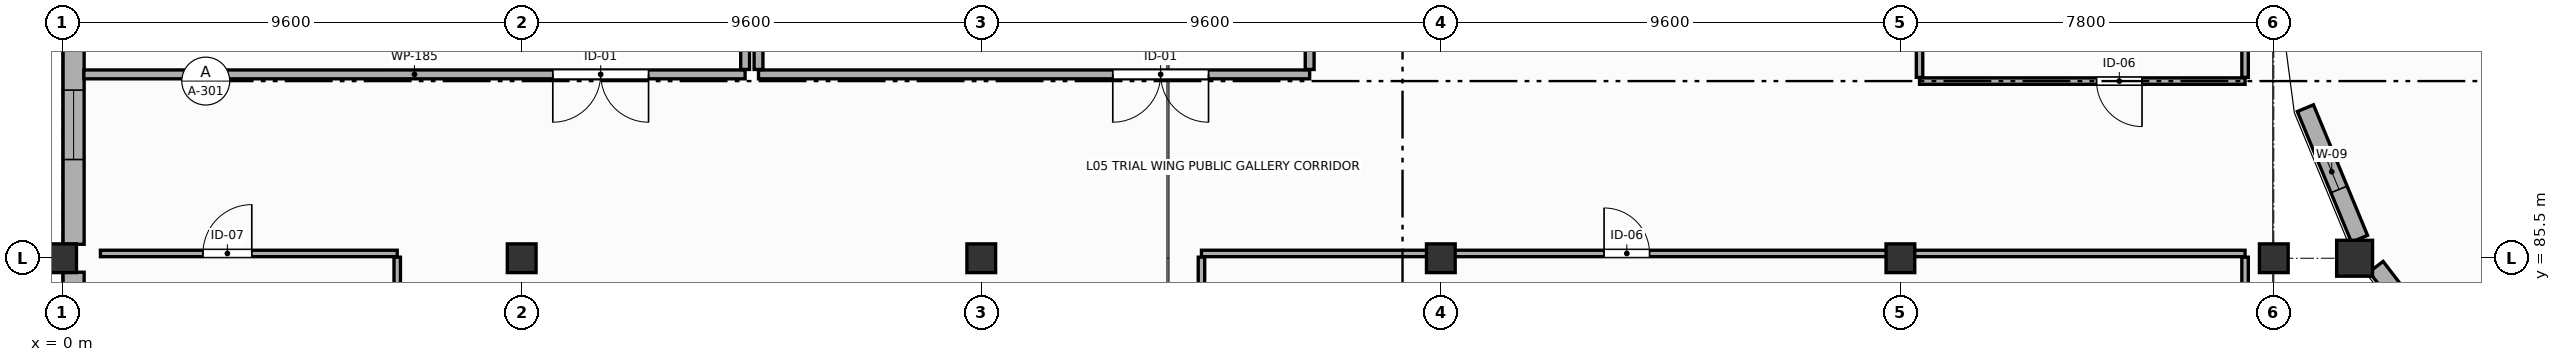
"""IFC4 building model, lengths in metres.
Left out: names, types, materials, properties, quantities, classifications, styles, units other than length and angle.
Written with IfcOpenShell. Run it as: python <this file> out.ifc"""

import sys

from ifc_helpers import new_model, si_unit, direction, frame, frame_2d, origin, origin_2d, place, context, subcontext, project, spatial, rectangle, circle, extrude, element, fill, save


model = new_model("IFC4")
c1 = context("Model", 3, precision=1e-05, world=origin(), true_north=direction((0.0, 1.0)))
c2 = subcontext(c1, "Body", "Model", "MODEL_VIEW")
j1 = project(units=[si_unit("LENGTHUNIT", "METRE"), si_unit("PLANEANGLEUNIT", "RADIAN")], contexts=[c1])
p1 = place(None, origin())
s1 = spatial("IfcSite", under=j1, at=p1, CompositionType="ELEMENT")
p2 = place(p1, origin())
s2 = spatial("IfcBuilding", under=s1, at=p2, CompositionType="ELEMENT")
p3 = place(p2, frame((0.0, 0.0, 18.6)))
s3 = spatial("IfcBuildingStorey", under=s2, at=p3, CompositionType="ELEMENT", Elevation=18.6)
p4 = place(p3, frame((47.888, 85.5, 0.0), z_axis=(0.0, 0.0, 1.0), x_axis=(1.0, 0.0, 0.0)))
e1 = element("IfcColumn", 1, at=p4, inside=s3, PredefinedType="COLUMN", context=c2, shape_type="SweptSolid", body=[
    extrude(circle(Radius=0.375, at=origin_2d()), origin(), (0.0, 0.0, 1.0), 4.2),
])
for number, where, z_axis, x_axis in (
    (2, (0.0, 85.5, 0.0), (0.0, 0.0, 1.0), (1.0, 0.0, 0.0)),
    (3, (9.6, 85.5, 0.0), (0.0, 0.0, 1.0), (1.0, 0.0, 0.0)),
    (4, (19.2, 85.5, 0.0), (0.0, 0.0, 1.0), (1.0, 0.0, 0.0)),
    (5, (28.8, 85.5, 0.0), (0.0, 0.0, 1.0), (1.0, 0.0, 0.0)),
    (6, (38.4, 85.5, 0.0), (0.0, 0.0, 1.0), (1.0, 0.0, 0.0)),
    (7, (46.2, 85.5, 0.0), (0.0, 0.0, 1.0), (1.0, 0.0, 0.0)),
):
    element("IfcColumn", number, at=place(p3, frame(where, z_axis=z_axis, x_axis=x_axis)), inside=s3, PredefinedType="COLUMN", context=c2, shape_type="SweptSolid", body=[
        extrude(rectangle(XDim=0.6, YDim=0.6, at=origin_2d()), origin(), (0.0, 0.0, 1.0), 4.2),
    ])
p5 = place(p3, frame((46.86, 88.635, 0.0), z_axis=(0.0, 0.0, 1.0), x_axis=(0.382641509163, -0.923896896556, 0.0)))
e8 = element("IfcWall", 8, at=p5, inside=s3, PredefinedType="ELEMENTEDWALL", context=c2, shape_type="SweptSolid", body=[
    extrude(rectangle(XDim=2.952, YDim=0.365, at=frame_2d((1.476, 0.0))), origin(), (0.0, 0.0, 1.0), 3.09),
])
p6 = place(p5, frame((1.037, 0.0, 0.85)))
e9 = element("IfcOpeningElement", 9, at=p6, cuts=e8, PredefinedType="OPENING", context=c2, shape_type="SweptSolid", body=[
    extrude(rectangle(XDim=0.8, YDim=1.7, at=frame_2d((0.4, 0.85))), frame((0.0, 0.192, 0.0), z_axis=(0.0, -1.0, 0.0), x_axis=(1.0, 0.0, 0.0)), (0.0, 0.0, 1.0), 0.385),
])
p7 = place(p3, frame((48.339, 85.323, 0.0), z_axis=(0.0, 0.0, 1.0), x_axis=(0.608729278603, -0.79337800913, 0.0)))
e10 = element("IfcWall", 10, at=p7, inside=s3, PredefinedType="ELEMENTEDWALL", context=c2, shape_type="SweptSolid", body=[
    extrude(rectangle(XDim=2.875, YDim=0.365, at=frame_2d((1.437, 0.0))), origin(), (0.0, 0.0, 1.0), 3.09),
])
p8 = place(p7, frame((1.037, 0.0, 0.85)))
e11 = element("IfcOpeningElement", 11, at=p8, cuts=e10, PredefinedType="OPENING", context=c2, shape_type="SweptSolid", body=[
    extrude(rectangle(XDim=0.8, YDim=1.7, at=frame_2d((0.4, 0.85))), frame((0.0, 0.192, 0.0), z_axis=(0.0, -1.0, 0.0), x_axis=(1.0, 0.0, 0.0)), (0.0, 0.0, 1.0), 0.385),
])
p9 = place(p3, frame((0.24, 74.692, 0.0), z_axis=(0.0, 0.0, 1.0), x_axis=(0.0, 1.0, 0.0)))
e12 = element("IfcWall", 12, at=p9, inside=s3, PredefinedType="STANDARD", context=c2, shape_type="SweptSolid", body=[
    extrude(rectangle(XDim=10.516, YDim=0.44, at=frame_2d((5.258, 0.0))), origin(), (0.0, 0.0, 1.0), 3.09),
])
p10 = place(p9, frame((1.52, 0.0, 0.85)))
e13 = element("IfcOpeningElement", 13, at=p10, cuts=e12, PredefinedType="OPENING", context=c2, shape_type="SweptSolid", body=[
    extrude(rectangle(XDim=1.45, YDim=2.05, at=frame_2d((0.725, 1.025))), frame((0.0, 0.23, 0.0), z_axis=(0.0, -1.0, 0.0), x_axis=(1.0, 0.0, 0.0)), (0.0, 0.0, 1.0), 0.46),
])
p11 = place(p9, frame((4.533, 0.0, 0.85)))
e14 = element("IfcOpeningElement", 14, at=p11, cuts=e12, PredefinedType="OPENING", context=c2, shape_type="SweptSolid", body=[
    extrude(rectangle(XDim=1.45, YDim=2.05, at=frame_2d((0.725, 1.025))), frame((0.0, 0.23, 0.0), z_axis=(0.0, -1.0, 0.0), x_axis=(1.0, 0.0, 0.0)), (0.0, 0.0, 1.0), 0.46),
])
p12 = place(p9, frame((7.546, 0.0, 0.85)))
e15 = element("IfcOpeningElement", 15, at=p12, cuts=e12, PredefinedType="OPENING", context=c2, shape_type="SweptSolid", body=[
    extrude(rectangle(XDim=1.45, YDim=2.05, at=frame_2d((0.725, 1.025))), frame((0.0, 0.23, 0.0), z_axis=(0.0, -1.0, 0.0), x_axis=(1.0, 0.0, 0.0)), (0.0, 0.0, 1.0), 0.46),
])
p13 = place(p3, frame((0.24, 85.792, 0.0), z_axis=(0.0, 0.0, 1.0), x_axis=(0.0, 1.0, 0.0)))
e16 = element("IfcWall", 16, at=p13, inside=s3, PredefinedType="STANDARD", context=c2, shape_type="SweptSolid", body=[
    extrude(rectangle(XDim=12.016, YDim=0.44, at=frame_2d((6.008, 0.0))), origin(), (0.0, 0.0, 1.0), 3.04),
])
p14 = place(p13, frame((1.77, 0.0, 0.77)))
e17 = element("IfcOpeningElement", 17, at=p14, cuts=e16, PredefinedType="OPENING", context=c2, shape_type="SweptSolid", body=[
    extrude(rectangle(XDim=1.45, YDim=2.05, at=frame_2d((0.725, 1.025))), frame((0.0, 0.23, 0.0), z_axis=(0.0, -1.0, 0.0), x_axis=(1.0, 0.0, 0.0)), (0.0, 0.0, 1.0), 0.46),
])
p15 = place(p13, frame((5.283, 0.0, 0.77)))
e18 = element("IfcOpeningElement", 18, at=p15, cuts=e16, PredefinedType="OPENING", context=c2, shape_type="SweptSolid", body=[
    extrude(rectangle(XDim=1.45, YDim=2.05, at=frame_2d((0.725, 1.025))), frame((0.0, 0.23, 0.0), z_axis=(0.0, -1.0, 0.0), x_axis=(1.0, 0.0, 0.0)), (0.0, 0.0, 1.0), 0.46),
])
p16 = place(p13, frame((8.796, 0.0, 0.77)))
e19 = element("IfcOpeningElement", 19, at=p16, cuts=e16, PredefinedType="OPENING", context=c2, shape_type="SweptSolid", body=[
    extrude(rectangle(XDim=1.45, YDim=2.05, at=frame_2d((0.725, 1.025))), frame((0.0, 0.23, 0.0), z_axis=(0.0, -1.0, 0.0), x_axis=(1.0, 0.0, 0.0)), (0.0, 0.0, 1.0), 0.46),
])
p17 = place(p3, frame((14.267, 89.34, 0.0), z_axis=(0.0, 0.0, 1.0), x_axis=(-1.0, 0.0, 0.0)))
e20 = element("IfcWall", 20, at=p17, inside=s3, PredefinedType="PARTITIONING", context=c2, shape_type="SweptSolid", body=[
    extrude(rectangle(XDim=13.813, YDim=0.185, at=frame_2d((6.906, 0.0))), origin(), (0.0, 0.0, 1.0), 3.09),
])
p18 = place(p17, frame((2.017, 0.0, 0.0)))
e21 = element("IfcOpeningElement", 21, at=p18, cuts=e20, PredefinedType="OPENING", context=c2, shape_type="SweptSolid", body=[
    extrude(rectangle(XDim=2.0, YDim=2.5, at=frame_2d((1.0, 1.25))), frame((0.0, 0.103, 0.0), z_axis=(0.0, -1.0, 0.0), x_axis=(1.0, 0.0, 0.0)), (0.0, 0.0, 1.0), 0.205),
])
p19 = place(p3, frame((14.267, 112.346, 0.0), z_axis=(0.0, 0.0, 1.0), x_axis=(0.0, -1.0, 0.0)))
e22 = element("IfcWall", 22, at=p19, inside=s3, PredefinedType="PARTITIONING", context=c2, shape_type="SweptSolid", body=[
    extrude(rectangle(XDim=22.904, YDim=0.185, at=frame_2d((11.452, 0.0))), origin(), (0.0, 0.0, 1.0), 3.29),
])
p20 = place(p3, frame((26.06, 89.34, 0.0), z_axis=(0.0, 0.0, 1.0), x_axis=(-1.0, 0.0, 0.0)))
e23 = element("IfcWall", 23, at=p20, inside=s3, PredefinedType="PARTITIONING", context=c2, shape_type="SweptSolid", body=[
    extrude(rectangle(XDim=11.513, YDim=0.185, at=frame_2d((5.756, 0.0))), origin(), (0.0, 0.0, 1.0), 3.09),
])
p21 = place(p20, frame((2.113, 0.0, 0.0)))
e24 = element("IfcOpeningElement", 24, at=p21, cuts=e23, PredefinedType="OPENING", context=c2, shape_type="SweptSolid", body=[
    extrude(rectangle(XDim=2.0, YDim=2.5, at=frame_2d((1.0, 1.25))), frame((0.0, 0.103, 0.0), z_axis=(0.0, -1.0, 0.0), x_axis=(1.0, 0.0, 0.0)), (0.0, 0.0, 1.0), 0.205),
])
for number, where, z_axis, x_axis in (
    (25, (14.547, 89.442, 0.0), (0.0, 0.0, 1.0), (0.0, 1.0, 0.0)),
    (26, (26.06, 97.597, 0.0), (0.0, 0.0, 1.0), (0.0, -1.0, 0.0)),
):
    element("IfcWall", number, at=place(p3, frame(where, z_axis=z_axis, x_axis=x_axis)), inside=s3, PredefinedType="PARTITIONING", context=c2, shape_type="SweptSolid", body=[
        extrude(rectangle(XDim=8.155, YDim=0.185, at=frame_2d((4.078, 0.0))), origin(), (0.0, 0.0, 1.0), 3.34),
    ])
p22 = place(p3, frame((45.6, 89.2, 0.0), z_axis=(0.0, 0.0, 1.0), x_axis=(-1.0, 0.0, 0.0)))
e27 = element("IfcWall", 27, at=p22, inside=s3, PredefinedType="PARTITIONING", context=c2, shape_type="SweptSolid", body=[
    extrude(rectangle(XDim=6.8, YDim=0.135, at=frame_2d((3.4, 0.0))), origin(), (0.0, 0.0, 1.0), 3.09),
])
p23 = place(p22, frame((2.153, 0.0, 0.0)))
e28 = element("IfcOpeningElement", 28, at=p23, cuts=e27, PredefinedType="OPENING", context=c2, shape_type="SweptSolid", body=[
    extrude(rectangle(XDim=0.95, YDim=2.15, at=frame_2d((0.475, 1.075))), frame((0.0, 0.077, 0.0), z_axis=(0.0, -1.0, 0.0), x_axis=(1.0, 0.0, 0.0)), (0.0, 0.0, 1.0), 0.155),
])
p24 = place(p3, frame((38.8, 89.278, 0.0), z_axis=(0.0, 0.0, 1.0), x_axis=(0.0, 1.0, 0.0)))
e29 = element("IfcWall", 29, at=p24, inside=s3, PredefinedType="PARTITIONING", context=c2, shape_type="SweptSolid", body=[
    extrude(rectangle(XDim=12.645, YDim=0.135, at=frame_2d((6.323, 0.0))), origin(), (0.0, 0.0, 1.0), 3.04),
])
p25 = place(p3, frame((45.6, 101.923, 0.0), z_axis=(0.0, 0.0, 1.0), x_axis=(0.0, -1.0, 0.0)))
e30 = element("IfcWall", 30, at=p25, inside=s3, PredefinedType="PARTITIONING", context=c2, shape_type="SweptSolid", body=[
    extrude(rectangle(XDim=12.645, YDim=0.135, at=frame_2d((6.323, 0.0))), origin(), (0.0, 0.0, 1.0), 3.34),
])
p26 = place(p3, frame((0.8, 85.6, 0.0), z_axis=(0.0, 0.0, 1.0), x_axis=(1.0, 0.0, 0.0)))
e31 = element("IfcWall", 31, at=p26, inside=s3, PredefinedType="PARTITIONING", context=c2, shape_type="SweptSolid", body=[
    extrude(rectangle(XDim=6.2, YDim=0.135, at=frame_2d((3.1, 0.0))), origin(), (0.0, 0.0, 1.0), 3.29),
])
p27 = place(p26, frame((2.142, 0.0, 0.0)))
e32 = element("IfcOpeningElement", 32, at=p27, cuts=e31, PredefinedType="OPENING", context=c2, shape_type="SweptSolid", body=[
    extrude(rectangle(XDim=1.02, YDim=2.15, at=frame_2d((0.51, 1.075))), frame((0.0, 0.077, 0.0), z_axis=(0.0, -1.0, 0.0), x_axis=(1.0, 0.0, 0.0)), (0.0, 0.0, 1.0), 0.155),
])
p28 = place(p3, frame((7.0, 85.522, 0.0), z_axis=(0.0, 0.0, 1.0), x_axis=(0.0, -1.0, 0.0)))
e33 = element("IfcWall", 33, at=p28, inside=s3, PredefinedType="PARTITIONING", context=c2, shape_type="SweptSolid", body=[
    extrude(rectangle(XDim=17.868, YDim=0.135, at=frame_2d((8.934, 0.0))), origin(), (0.0, 0.0, 1.0), 3.29),
])
p29 = place(p3, frame((23.8, 85.6, 0.0), z_axis=(0.0, 0.0, 1.0), x_axis=(1.0, 0.0, 0.0)))
e34 = element("IfcWall", 34, at=p29, inside=s3, PredefinedType="PARTITIONING", context=c2, shape_type="SweptSolid", body=[
    extrude(rectangle(XDim=21.8, YDim=0.135, at=frame_2d((10.9, 0.0))), origin(), (0.0, 0.0, 1.0), 3.09),
])
p30 = place(p29, frame((8.41, 0.0, 0.0)))
e35 = element("IfcOpeningElement", 35, at=p30, cuts=e34, PredefinedType="OPENING", context=c2, shape_type="SweptSolid", body=[
    extrude(rectangle(XDim=0.95, YDim=2.15, at=frame_2d((0.475, 1.075))), frame((0.0, 0.077, 0.0), z_axis=(0.0, -1.0, 0.0), x_axis=(1.0, 0.0, 0.0)), (0.0, 0.0, 1.0), 0.155),
])
p31 = place(p3, frame((23.8, 67.654, 0.0), z_axis=(0.0, 0.0, 1.0), x_axis=(0.0, 1.0, 0.0)))
e36 = element("IfcWall", 36, at=p31, inside=s3, PredefinedType="PARTITIONING", context=c2, shape_type="SweptSolid", body=[
    extrude(rectangle(XDim=17.868, YDim=0.135, at=frame_2d((8.934, 0.0))), origin(), (0.0, 0.0, 1.0), 3.29),
])
p32 = place(p3, frame((45.6, 85.522, 0.0), z_axis=(0.0, 0.0, 1.0), x_axis=(0.0, -1.0, 0.0)))
e37 = element("IfcWall", 37, at=p32, inside=s3, PredefinedType="PARTITIONING", context=c2, shape_type="SweptSolid", body=[
    extrude(rectangle(XDim=17.868, YDim=0.135, at=frame_2d((8.934, 0.0))), origin(), (0.0, 0.0, 1.0), 3.39),
])
p33 = place(p6, origin())
e38 = element("IfcWindow", 38, at=p33, inside=s3, PartitioningType="SINGLE_PANEL", PredefinedType="WINDOW", context=c2, shape_type="SweptSolid", body=[
    extrude(rectangle(XDim=0.8, YDim=1.7, at=frame_2d((0.4, 0.85))), frame((0.0, 0.03, 0.0), z_axis=(0.0, -1.0, 0.0), x_axis=(1.0, 0.0, 0.0)), (0.0, 0.0, 1.0), 0.06),
])
fill(e9, e38)
p34 = place(p14, origin())
e39 = element("IfcWindow", 39, at=p34, inside=s3, PartitioningType="SINGLE_PANEL", PredefinedType="WINDOW", context=c2, shape_type="SweptSolid", body=[
    extrude(rectangle(XDim=1.45, YDim=2.05, at=frame_2d((0.725, 1.025))), frame((0.0, 0.03, 0.0), z_axis=(0.0, -1.0, 0.0), x_axis=(1.0, 0.0, 0.0)), (0.0, 0.0, 1.0), 0.06),
])
fill(e17, e39)
p35 = place(p18, origin())
e40 = element("IfcDoor", 40, at=p35, inside=s3, OperationType="DOUBLE_DOOR_SINGLE_SWING", PredefinedType="DOOR", context=c2, shape_type="SweptSolid", body=[
    extrude(rectangle(XDim=2.0, YDim=2.5, at=frame_2d((1.0, 1.25))), frame((0.0, 0.025, 0.0), z_axis=(0.0, -1.0, 0.0), x_axis=(1.0, 0.0, 0.0)), (0.0, 0.0, 1.0), 0.05),
])
fill(e21, e40)
p36 = place(p21, origin())
e41 = element("IfcDoor", 41, at=p36, inside=s3, OperationType="DOUBLE_DOOR_SINGLE_SWING", PredefinedType="DOOR", context=c2, shape_type="SweptSolid", body=[
    extrude(rectangle(XDim=2.0, YDim=2.5, at=frame_2d((1.0, 1.25))), frame((0.0, 0.025, 0.0), z_axis=(0.0, -1.0, 0.0), x_axis=(1.0, 0.0, 0.0)), (0.0, 0.0, 1.0), 0.05),
])
fill(e24, e41)
p37 = place(p23, origin())
e42 = element("IfcDoor", 42, at=p37, inside=s3, OperationType="SINGLE_SWING_LEFT", PredefinedType="DOOR", context=c2, shape_type="SweptSolid", body=[
    extrude(rectangle(XDim=0.95, YDim=2.15, at=frame_2d((0.475, 1.075))), frame((0.0, 0.025, 0.0), z_axis=(0.0, -1.0, 0.0), x_axis=(1.0, 0.0, 0.0)), (0.0, 0.0, 1.0), 0.05),
])
fill(e28, e42)
p38 = place(p27, origin())
e43 = element("IfcDoor", 43, at=p38, inside=s3, OperationType="SINGLE_SWING_RIGHT", PredefinedType="DOOR", context=c2, shape_type="SweptSolid", body=[
    extrude(rectangle(XDim=1.02, YDim=2.15, at=frame_2d((0.51, 1.075))), frame((0.0, 0.025, 0.0), z_axis=(0.0, -1.0, 0.0), x_axis=(1.0, 0.0, 0.0)), (0.0, 0.0, 1.0), 0.05),
])
fill(e32, e43)
p39 = place(p30, origin())
e44 = element("IfcDoor", 44, at=p39, inside=s3, OperationType="SINGLE_SWING_LEFT", PredefinedType="DOOR", context=c2, shape_type="SweptSolid", body=[
    extrude(rectangle(XDim=0.95, YDim=2.15, at=frame_2d((0.475, 1.075))), frame((0.0, 0.025, 0.0), z_axis=(0.0, -1.0, 0.0), x_axis=(1.0, 0.0, 0.0)), (0.0, 0.0, 1.0), 0.05),
])
fill(e35, e44)
save(model, sys.argv[1])
